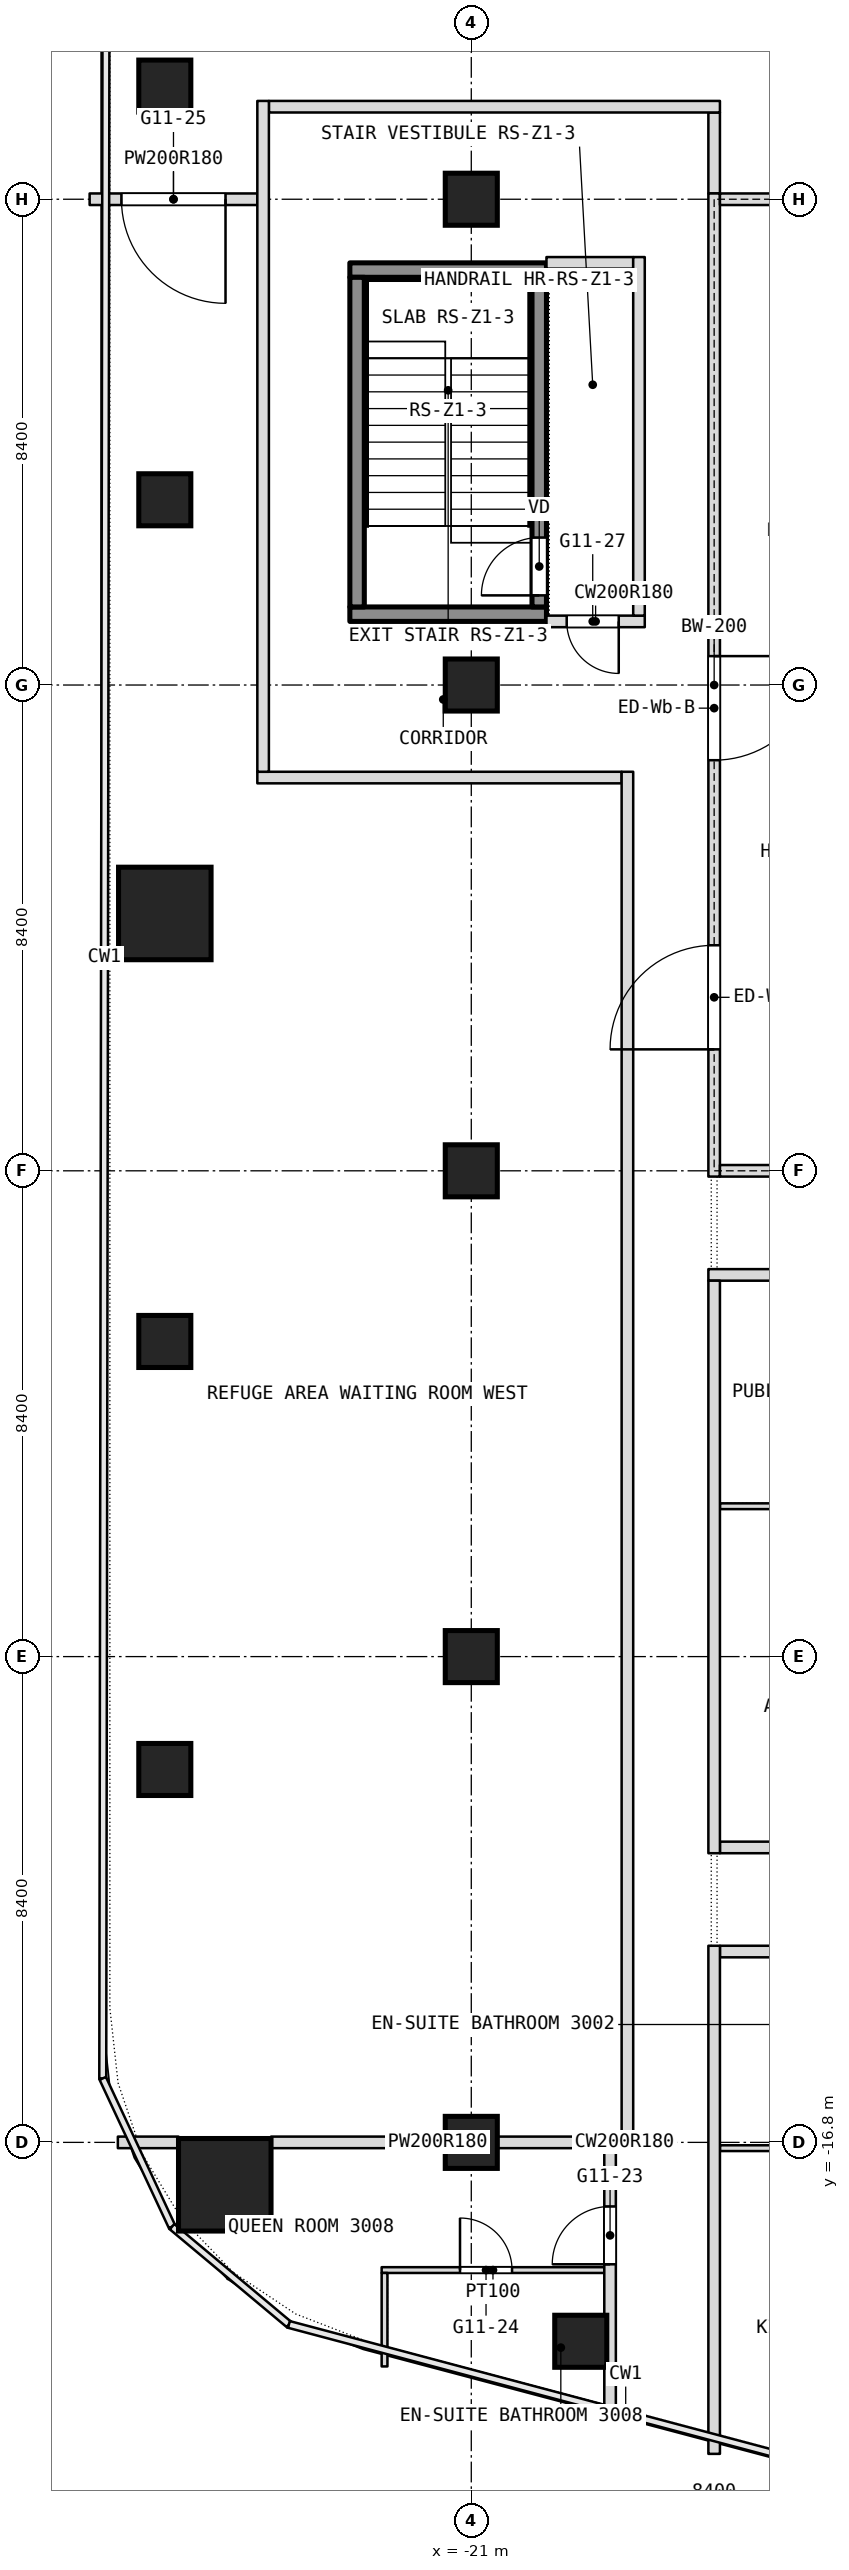
"""IFC4 building model, lengths in metres.
Left out: names, types, materials, properties, quantities, classifications, styles, units other than length and angle.
Written with IfcOpenShell. Run it as: python <this file> out.ifc"""

import sys

from ifc_helpers import new_model, si_unit, direction, frame, frame_2d, origin, origin_2d, place, context, subcontext, project, spatial, rectangle, extrude, element, fill, save


model = new_model("IFC4")
c1 = context("Model", 3, precision=1e-05, world=origin(), true_north=direction((0.0, 1.0)))
c2 = subcontext(c1, "Body", "Model", "MODEL_VIEW")
j1 = project(units=[si_unit("LENGTHUNIT", "METRE"), si_unit("PLANEANGLEUNIT", "RADIAN")], contexts=[c1])
p1 = place(None, origin())
s1 = spatial("IfcSite", under=j1, at=p1, CompositionType="ELEMENT")
p2 = place(p1, origin())
s2 = spatial("IfcBuilding", under=s1, at=p2, CompositionType="ELEMENT")
p3 = place(p2, frame((0.0, 0.0, 133.7)))
s3 = spatial("IfcBuildingStorey", under=s2, at=p3, CompositionType="ELEMENT", Elevation=133.7)
for number, where, z_axis, x_axis in (
    (1, (-25.263, -17.533, 0.0), (0.0, 0.0, 1.0), (1.0, 0.0, 0.0)),
    (2, (-26.3, 4.45, 0.0), (0.0, 0.0, 1.0), (1.0, 0.0, 0.0)),
):
    element("IfcColumn", number, at=place(p3, frame(where, z_axis=z_axis, x_axis=x_axis)), inside=s3, PredefinedType="COLUMN", context=c2, shape_type="SweptSolid", body=[
        extrude(rectangle(XDim=1.6, YDim=1.6, at=origin_2d()), origin(), (0.0, 0.0, 1.0), 3.6),
    ])
for number, where, z_axis, x_axis in (
    (3, (-21.0, -16.8, 0.0), (0.0, 0.0, 1.0), (1.0, 0.0, 0.0)),
    (4, (-21.0, -8.4, 0.0), (0.0, 0.0, 1.0), (1.0, 0.0, 0.0)),
    (5, (-21.0, 0.0, 0.0), (0.0, 0.0, 1.0), (1.0, 0.0, 0.0)),
    (6, (-21.0, 8.4, 0.0), (0.0, 0.0, 1.0), (1.0, 0.0, 0.0)),
    (7, (-21.0, 16.8, 0.0), (0.0, 0.0, 1.0), (1.0, 0.0, 0.0)),
    (8, (-26.3, -10.352, 0.0), (0.0, 0.0, 1.0), (1.0, 0.0, 0.0)),
    (9, (-26.3, -2.951, 0.0), (0.0, 0.0, 1.0), (1.0, 0.0, 0.0)),
    (10, (-26.3, 11.603, 0.0), (0.0, 0.0, 1.0), (1.0, 0.0, 0.0)),
    (11, (-26.3, 18.756, 0.0), (0.0, 0.0, 1.0), (1.0, 0.0, 0.0)),
    (12, (-19.107, -20.239, 0.0), (0.0, 0.0, 1.0), (1.0, 0.0, 0.0)),
):
    element("IfcColumn", number, at=place(p3, frame(where, z_axis=z_axis, x_axis=x_axis)), inside=s3, PredefinedType="COLUMN", context=c2, shape_type="SweptSolid", body=[
        extrude(rectangle(XDim=0.9, YDim=0.9, at=origin_2d()), origin(), (0.0, 0.0, 1.0), 3.6),
    ])
p4 = place(p3, frame((-22.55, -19.008, 0.0), z_axis=(0.0, 0.0, 1.0), x_axis=(1.0, 0.0, 0.0)))
e13 = element("IfcWall", 13, at=p4, inside=s3, PredefinedType="PARTITIONING", context=c2, shape_type="SweptSolid", body=[
    extrude(rectangle(XDim=3.85, YDim=0.1, at=frame_2d((1.925, 0.0))), origin(), (0.0, 0.0, 1.0), 3.34),
])
p5 = place(p4, frame((1.355, 0.0, 0.0)))
e14 = element("IfcOpeningElement", 14, at=p5, cuts=e13, PredefinedType="OPENING", context=c2, shape_type="SweptSolid", body=[
    extrude(rectangle(XDim=0.9, YDim=2.1, at=frame_2d((0.45, 1.05))), frame((0.0, 0.05, 0.0), z_axis=(0.0, -1.0, 0.0), x_axis=(1.0, 0.0, 0.0)), (0.0, 0.0, 1.0), 0.1),
])
p6 = place(p3, frame((-16.7, -16.9, 0.0), z_axis=(0.0, 0.0, 1.0), x_axis=(1.0, 0.0, 0.0)))
e15 = element("IfcWall", 15, at=p6, inside=s3, PredefinedType="PARTITIONING", context=c2, shape_type="SweptSolid", body=[
    extrude(rectangle(XDim=2.35, YDim=0.1, at=frame_2d((1.175, 0.0))), origin(), (0.0, 0.0, 1.0), 2.89),
])
p7 = place(p6, frame((1.3, 0.0, 0.0)))
e16 = element("IfcOpeningElement", 16, at=p7, cuts=e15, PredefinedType="OPENING", context=c2, shape_type="SweptSolid", body=[
    extrude(rectangle(XDim=0.9, YDim=2.1, at=frame_2d((0.45, 1.05))), frame((0.0, 0.05, 0.0), z_axis=(0.0, -1.0, 0.0), x_axis=(1.0, 0.0, 0.0)), (0.0, 0.0, 1.0), 0.1),
])
p8 = place(p3, frame((-27.112, -16.8, 0.0), z_axis=(0.0, 0.0, 1.0), x_axis=(1.0, 0.0, 0.0)))
e17 = element("IfcWall", 17, at=p8, inside=s3, PredefinedType="PARTITIONING", context=c2, shape_type="SweptSolid", body=[
    extrude(rectangle(XDim=1.049, YDim=0.2, at=frame_2d((0.524, 0.0))), origin(), (0.0, 0.0, 1.0), 3.34),
])
p9 = place(p3, frame((-24.463, -16.8, 0.0), z_axis=(0.0, 0.0, 1.0), x_axis=(1.0, 0.0, 0.0)))
e18 = element("IfcWall", 18, at=p9, inside=s3, PredefinedType="PARTITIONING", context=c2, shape_type="SweptSolid", body=[
    extrude(rectangle(XDim=5.763, YDim=0.2, at=frame_2d((2.881, 0.0))), origin(), (0.0, 0.0, 1.0), 2.89),
])
p10 = place(p3, frame((-18.5, -16.8, 0.0), z_axis=(0.0, 0.0, 1.0), x_axis=(1.0, 0.0, 0.0)))
e19 = element("IfcWall", 19, at=p10, inside=s3, PredefinedType="PARTITIONING", context=c2, shape_type="SweptSolid", body=[
    extrude(rectangle(XDim=0.3, YDim=0.2, at=frame_2d((0.15, 0.0))), origin(), (0.0, 0.0, 1.0), 3.34),
])
p11 = place(p3, frame((-16.7, -13.5, 0.0), z_axis=(0.0, 0.0, 1.0), x_axis=(1.0, 0.0, 0.0)))
e20 = element("IfcWall", 20, at=p11, inside=s3, PredefinedType="PARTITIONING", context=c2, shape_type="SweptSolid", body=[
    extrude(rectangle(XDim=4.1, YDim=0.2, at=frame_2d((2.05, 0.0))), origin(), (0.0, 0.0, 1.0), 3.34),
])
p12 = place(p11, frame((2.7, 0.0, 0.0)))
e21 = element("IfcOpeningElement", 21, at=p12, cuts=e20, PredefinedType="OPENING", context=c2, shape_type="SweptSolid", body=[
    extrude(rectangle(XDim=1.0, YDim=2.1, at=frame_2d((0.5, 1.05))), frame((0.0, 0.1, 0.0), z_axis=(0.0, -1.0, 0.0), x_axis=(1.0, 0.0, 0.0)), (0.0, 0.0, 1.0), 0.2),
])
p13 = place(p3, frame((-16.7, -11.7, 0.0), z_axis=(0.0, 0.0, 1.0), x_axis=(1.0, 0.0, 0.0)))
e22 = element("IfcWall", 22, at=p13, inside=s3, PredefinedType="PARTITIONING", context=c2, shape_type="SweptSolid", body=[
    extrude(rectangle(XDim=5.8, YDim=0.2, at=frame_2d((2.9, 0.0))), origin(), (0.0, 0.0, 1.0), 3.34),
])
p14 = place(p3, frame((-16.7, -5.8, 0.0), z_axis=(0.0, 0.0, 1.0), x_axis=(1.0, 0.0, 0.0)))
e23 = element("IfcWall", 23, at=p14, inside=s3, PredefinedType="PARTITIONING", context=c2, shape_type="SweptSolid", body=[
    extrude(rectangle(XDim=4.2, YDim=0.1, at=frame_2d((2.1, 0.0))), origin(), (0.0, 0.0, 1.0), 3.34),
])
p15 = place(p14, frame((1.55, 0.0, 0.0)))
e24 = element("IfcOpeningElement", 24, at=p15, cuts=e23, PredefinedType="OPENING", context=c2, shape_type="SweptSolid", body=[
    extrude(rectangle(XDim=0.9, YDim=2.1, at=frame_2d((0.45, 1.05))), frame((0.0, 0.05, 0.0), z_axis=(0.0, -1.0, 0.0), x_axis=(1.0, 0.0, 0.0)), (0.0, 0.0, 1.0), 0.1),
])
p16 = place(p3, frame((-16.9, -1.8, 0.0), z_axis=(0.0, 0.0, 1.0), x_axis=(1.0, 0.0, 0.0)))
e25 = element("IfcWall", 25, at=p16, inside=s3, PredefinedType="PARTITIONING", context=c2, shape_type="SweptSolid", body=[
    extrude(rectangle(XDim=8.2, YDim=0.2, at=frame_2d((4.1, 0.0))), origin(), (0.0, 0.0, 1.0), 3.34),
])
p17 = place(p16, frame((1.7, 0.0, 0.0)))
e26 = element("IfcOpeningElement", 26, at=p17, cuts=e25, PredefinedType="OPENING", context=c2, shape_type="SweptSolid", body=[
    extrude(rectangle(XDim=1.0, YDim=2.1, at=frame_2d((0.5, 1.05))), frame((0.0, 0.1, 0.0), z_axis=(0.0, -1.0, 0.0), x_axis=(1.0, 0.0, 0.0)), (0.0, 0.0, 1.0), 0.2),
])
p18 = place(p16, frame((5.8, 0.0, 0.0)))
e27 = element("IfcOpeningElement", 27, at=p18, cuts=e25, PredefinedType="OPENING", context=c2, shape_type="SweptSolid", body=[
    extrude(rectangle(XDim=1.0, YDim=2.1, at=frame_2d((0.5, 1.05))), frame((0.0, 0.1, 0.0), z_axis=(0.0, -1.0, 0.0), x_axis=(1.0, 0.0, 0.0)), (0.0, 0.0, 1.0), 0.2),
])
p19 = place(p3, frame((-24.7, 6.8, 0.0), z_axis=(0.0, 0.0, 1.0), x_axis=(1.0, 0.0, 0.0)))
e28 = element("IfcWall", 28, at=p19, inside=s3, PredefinedType="PARTITIONING", context=c2, shape_type="SweptSolid", body=[
    extrude(rectangle(XDim=6.3, YDim=0.2, at=frame_2d((3.15, 0.0))), origin(), (0.0, 0.0, 1.0), 3.34),
])
p20 = place(p3, frame((-19.7, 9.5, 0.0), z_axis=(0.0, 0.0, 1.0), x_axis=(1.0, 0.0, 0.0)))
e29 = element("IfcWall", 29, at=p20, inside=s3, PredefinedType="PARTITIONING", context=c2, shape_type="SweptSolid", body=[
    extrude(rectangle(XDim=1.7, YDim=0.2, at=frame_2d((0.85, 0.0))), origin(), (0.0, 0.0, 1.0), 3.34),
])
p21 = place(p20, frame((0.35, 0.0, 0.0)))
e30 = element("IfcOpeningElement", 30, at=p21, cuts=e29, PredefinedType="OPENING", context=c2, shape_type="SweptSolid", body=[
    extrude(rectangle(XDim=0.9, YDim=2.1, at=frame_2d((0.45, 1.05))), frame((0.0, 0.1, 0.0), z_axis=(0.0, -1.0, 0.0), x_axis=(1.0, 0.0, 0.0)), (0.0, 0.0, 1.0), 0.2),
])
p22 = place(p3, frame((-19.7, 15.7, 0.0), z_axis=(0.0, 0.0, 1.0), x_axis=(1.0, 0.0, 0.0)))
e31 = element("IfcWall", 31, at=p22, inside=s3, PredefinedType="PARTITIONING", context=c2, shape_type="SweptSolid", body=[
    extrude(rectangle(XDim=1.5, YDim=0.2, at=frame_2d((0.75, 0.0))), origin(), (0.0, 0.0, 1.0), 3.34),
])
p23 = place(p3, frame((-16.8, -22.186, 0.0), z_axis=(0.0, 0.0, 1.0), x_axis=(0.0, 1.0, 0.0)))
e32 = element("IfcWall", 32, at=p23, inside=s3, PredefinedType="PARTITIONING", context=c2, shape_type="SweptSolid", body=[
    extrude(rectangle(XDim=8.786, YDim=0.2, at=frame_2d((4.393, 0.0))), origin(), (0.0, 0.0, 1.0), 3.34),
])
p24 = place(p3, frame((-16.8, -11.8, 0.0), z_axis=(0.0, 0.0, 1.0), x_axis=(0.0, 1.0, 0.0)))
e33 = element("IfcWall", 33, at=p24, inside=s3, PredefinedType="PARTITIONING", context=c2, shape_type="SweptSolid", body=[
    extrude(rectangle(XDim=9.9, YDim=0.2, at=frame_2d((4.95, 0.0))), origin(), (0.0, 0.0, 1.0), 3.34),
])
p25 = place(p3, frame((-16.8, 16.9, 0.0), z_axis=(0.0, 0.0, 1.0), x_axis=(0.0, 1.0, 0.0)))
e34 = element("IfcWall", 34, at=p25, inside=s3, PredefinedType="PARTITIONING", context=c2, shape_type="SweptSolid", body=[
    extrude(rectangle(XDim=1.4, YDim=0.2, at=frame_2d((0.7, 0.0))), origin(), (0.0, 0.0, 1.0), 3.34),
])
p26 = place(p3, frame((-27.6, 16.8, 0.0), z_axis=(0.0, 0.0, 1.0), x_axis=(1.0, 0.0, 0.0)))
e35 = element("IfcWall", 35, at=p26, inside=s3, PredefinedType="PARTITIONING", context=c2, shape_type="SweptSolid", body=[
    extrude(rectangle(XDim=2.9, YDim=0.2, at=frame_2d((1.45, 0.0))), origin(), (0.0, 0.0, 1.0), 2.89),
])
p27 = place(p26, frame((0.55, 0.0, 0.0)))
e36 = element("IfcOpeningElement", 36, at=p27, cuts=e35, PredefinedType="OPENING", context=c2, shape_type="SweptSolid", body=[
    extrude(rectangle(XDim=1.8, YDim=2.1, at=frame_2d((0.9, 1.05))), frame((0.0, 0.1, 0.0), z_axis=(0.0, -1.0, 0.0), x_axis=(1.0, 0.0, 0.0)), (0.0, 0.0, 1.0), 0.2),
])
p28 = place(p3, frame((-18.1, 9.6, 0.0), z_axis=(0.0, 0.0, 1.0), x_axis=(0.0, 1.0, 0.0)))
e37 = element("IfcWall", 37, at=p28, inside=s3, PredefinedType="PARTITIONING", context=c2, shape_type="SweptSolid", body=[
    extrude(rectangle(XDim=6.2, YDim=0.2, at=frame_2d((3.1, 0.0))), origin(), (0.0, 0.0, 1.0), 3.34),
])
p29 = place(p3, frame((-18.3, -16.7, 0.0), z_axis=(0.0, 0.0, 1.0), x_axis=(0.0, 1.0, 0.0)))
e38 = element("IfcWall", 38, at=p29, inside=s3, PredefinedType="PARTITIONING", context=c2, shape_type="SweptSolid", body=[
    extrude(rectangle(XDim=23.6, YDim=0.2, at=frame_2d((11.8, 0.0))), origin(), (0.0, 0.0, 1.0), 3.34),
])
p30 = place(p3, frame((-24.5, 18.4, 0.0), z_axis=(0.0, 0.0, 1.0), x_axis=(1.0, 0.0, 0.0)))
e39 = element("IfcWall", 39, at=p30, inside=s3, PredefinedType="PARTITIONING", context=c2, shape_type="SweptSolid", body=[
    extrude(rectangle(XDim=7.8, YDim=0.2, at=frame_2d((3.9, 0.0))), origin(), (0.0, 0.0, 1.0), 3.34),
])
p31 = place(p3, frame((-18.6, -21.708, 0.0), z_axis=(0.0, 0.0, 1.0), x_axis=(0.0, 1.0, 0.0)))
e40 = element("IfcWall", 40, at=p31, inside=s3, PredefinedType="PARTITIONING", context=c2, shape_type="SweptSolid", body=[
    extrude(rectangle(XDim=5.008, YDim=0.2, at=frame_2d((2.504, 0.0))), origin(), (0.0, 0.0, 1.0), 3.34),
])
p32 = place(p31, frame((2.8, 0.0, 0.0)))
e41 = element("IfcOpeningElement", 41, at=p32, cuts=e40, PredefinedType="OPENING", context=c2, shape_type="SweptSolid", body=[
    extrude(rectangle(XDim=1.0, YDim=2.1, at=frame_2d((0.5, 1.05))), frame((0.0, 0.1, 0.0), z_axis=(0.0, -1.0, 0.0), x_axis=(1.0, 0.0, 0.0)), (0.0, 0.0, 1.0), 0.2),
])
p33 = place(p3, frame((-22.5, -20.674, 0.0), z_axis=(0.0, 0.0, 1.0), x_axis=(0.0, 1.0, 0.0)))
e42 = element("IfcWall", 42, at=p33, inside=s3, PredefinedType="PARTITIONING", context=c2, shape_type="SweptSolid", body=[
    extrude(rectangle(XDim=1.616, YDim=0.1, at=frame_2d((0.808, 0.0))), origin(), (0.0, 0.0, 1.0), 3.34),
])
p34 = place(p3, frame((-24.6, 6.9, 0.0), z_axis=(0.0, 0.0, 1.0), x_axis=(0.0, 1.0, 0.0)))
e43 = element("IfcWall", 43, at=p34, inside=s3, PredefinedType="PARTITIONING", context=c2, shape_type="SweptSolid", body=[
    extrude(rectangle(XDim=11.6, YDim=0.2, at=frame_2d((5.8, 0.0))), origin(), (0.0, 0.0, 1.0), 3.34),
])
p35 = place(p3, frame((-16.8, -0.1, 0.0), z_axis=(0.0, 0.0, 1.0), x_axis=(0.0, 1.0, 0.0)))
e44 = element("IfcWall", 44, at=p35, inside=s3, PredefinedType="PARTITIONING", context=c2, shape_type="SweptSolid", body=[
    extrude(rectangle(XDim=17.0, YDim=0.2, at=frame_2d((8.5, 0.0))), origin(), (0.0, 0.0, 1.0), 3.34),
])
p36 = place(p35, frame((2.2, 0.0, 0.0)))
e45 = element("IfcOpeningElement", 45, at=p36, cuts=e44, PredefinedType="OPENING", context=c2, shape_type="SweptSolid", body=[
    extrude(rectangle(XDim=1.8, YDim=2.1, at=frame_2d((0.9, 1.05))), frame((0.0, 0.1, 0.0), z_axis=(0.0, -1.0, 0.0), x_axis=(1.0, 0.0, 0.0)), (0.0, 0.0, 1.0), 0.2),
])
p37 = place(p35, frame((7.2, 0.0, 0.0)))
e46 = element("IfcOpeningElement", 46, at=p37, cuts=e44, PredefinedType="OPENING", context=c2, shape_type="SweptSolid", body=[
    extrude(rectangle(XDim=1.8, YDim=2.1, at=frame_2d((0.9, 1.05))), frame((0.0, 0.1, 0.0), z_axis=(0.0, -1.0, 0.0), x_axis=(1.0, 0.0, 0.0)), (0.0, 0.0, 1.0), 0.2),
])
p38 = place(p3, frame((-16.7, 0.0, 0.0), z_axis=(0.0, 0.0, 1.0), x_axis=(1.0, 0.0, 0.0)))
e47 = element("IfcWall", 47, at=p38, inside=s3, PredefinedType="PARTITIONING", context=c2, shape_type="SweptSolid", body=[
    extrude(rectangle(XDim=4.6, YDim=0.2, at=frame_2d((2.3, 0.0))), origin(), (0.0, 0.0, 1.0), 2.89),
])
p39 = place(p38, frame((3.1, 0.0, 0.0)))
e48 = element("IfcOpeningElement", 48, at=p39, cuts=e47, PredefinedType="OPENING", context=c2, shape_type="SweptSolid", body=[
    extrude(rectangle(XDim=1.2, YDim=2.1, at=frame_2d((0.6, 1.05))), frame((0.0, 0.1, 0.0), z_axis=(0.0, -1.0, 0.0), x_axis=(1.0, 0.0, 0.0)), (0.0, 0.0, 1.0), 0.2),
])
p40 = place(p3, frame((-16.7, 16.8, 0.0), z_axis=(0.0, 0.0, 1.0), x_axis=(1.0, 0.0, 0.0)))
e49 = element("IfcWall", 49, at=p40, inside=s3, PredefinedType="PARTITIONING", context=c2, shape_type="SweptSolid", body=[
    extrude(rectangle(XDim=4.6, YDim=0.2, at=frame_2d((2.3, 0.0))), origin(), (0.0, 0.0, 1.0), 2.89),
])
p41 = place(p40, frame((3.1, 0.0, 0.0)))
e50 = element("IfcOpeningElement", 50, at=p41, cuts=e49, PredefinedType="OPENING", context=c2, shape_type="SweptSolid", body=[
    extrude(rectangle(XDim=1.2, YDim=2.1, at=frame_2d((0.6, 1.05))), frame((0.0, 0.1, 0.0), z_axis=(0.0, -1.0, 0.0), x_axis=(1.0, 0.0, 0.0)), (0.0, 0.0, 1.0), 0.2),
])
for number, where, z_axis, x_axis in (
    (51, (-23.1, 9.625, 0.1), (0.0, 0.0, 1.0), (1.0, 0.0, 0.0)),
    (52, (-23.1, 15.575, 0.1), (0.0, 0.0, 1.0), (1.0, 0.0, 0.0)),
):
    element("IfcWall", number, at=place(p3, frame(where, z_axis=z_axis, x_axis=x_axis)), inside=s3, PredefinedType="SHEAR", context=c2, shape_type="SweptSolid", body=[
        extrude(rectangle(XDim=3.4, YDim=0.25, at=frame_2d((1.7, 0.0))), origin(), (0.0, 0.0, 1.0), 3.6),
    ])
p42 = place(p3, frame((-22.975, 9.75, 0.1), z_axis=(0.0, 0.0, 1.0), x_axis=(0.0, 1.0, 0.0)))
e53 = element("IfcWall", 53, at=p42, inside=s3, PredefinedType="SHEAR", context=c2, shape_type="SweptSolid", body=[
    extrude(rectangle(XDim=5.7, YDim=0.25, at=frame_2d((2.85, 0.0))), origin(), (0.0, 0.0, 1.0), 3.6),
])
p43 = place(p3, frame((-19.825, 9.75, 0.1), z_axis=(0.0, 0.0, 1.0), x_axis=(0.0, 1.0, 0.0)))
e54 = element("IfcWall", 54, at=p43, inside=s3, PredefinedType="SHEAR", context=c2, shape_type="SweptSolid", body=[
    extrude(rectangle(XDim=5.7, YDim=0.25, at=frame_2d((2.85, 0.0))), origin(), (0.0, 0.0, 1.0), 3.6),
])
p44 = place(p43, frame((0.2, 0.0, 0.0)))
e55 = element("IfcOpeningElement", 55, at=p44, cuts=e54, PredefinedType="OPENING", context=c2, shape_type="SweptSolid", body=[
    extrude(rectangle(XDim=1.0, YDim=2.1, at=frame_2d((0.5, 1.05))), frame((0.0, 0.125, 0.0), z_axis=(0.0, -1.0, 0.0), x_axis=(1.0, 0.0, 0.0)), (0.0, 0.0, 1.0), 0.25),
])
p45 = place(p5, origin())
e56 = element("IfcDoor", 56, at=p45, inside=s3, OperationType="SINGLE_SWING_LEFT", PredefinedType="DOOR", context=c2, shape_type="SweptSolid", body=[
    extrude(rectangle(XDim=0.9, YDim=2.1, at=frame_2d((0.45, 1.05))), frame((0.0, 0.025, 0.0), z_axis=(0.0, -1.0, 0.0), x_axis=(1.0, 0.0, 0.0)), (0.0, 0.0, 1.0), 0.05),
])
fill(e14, e56)
p46 = place(p21, origin())
e57 = element("IfcDoor", 57, at=p46, inside=s3, OperationType="SINGLE_SWING_RIGHT", PredefinedType="DOOR", context=c2, shape_type="SweptSolid", body=[
    extrude(rectangle(XDim=0.9, YDim=2.1, at=frame_2d((0.45, 1.05))), frame((0.0, 0.025, 0.0), z_axis=(0.0, -1.0, 0.0), x_axis=(1.0, 0.0, 0.0)), (0.0, 0.0, 1.0), 0.05),
])
fill(e30, e57)
p47 = place(p27, origin())
e58 = element("IfcDoor", 58, at=p47, inside=s3, OperationType="DOUBLE_DOOR_SINGLE_SWING", PredefinedType="DOOR", context=c2, shape_type="SweptSolid", body=[
    extrude(rectangle(XDim=1.8, YDim=2.1, at=frame_2d((0.9, 1.05))), frame((0.0, 0.025, 0.0), z_axis=(0.0, -1.0, 0.0), x_axis=(1.0, 0.0, 0.0)), (0.0, 0.0, 1.0), 0.05),
])
fill(e36, e58)
p48 = place(p32, origin())
e59 = element("IfcDoor", 59, at=p48, inside=s3, OperationType="SINGLE_SWING_LEFT", PredefinedType="DOOR", context=c2, shape_type="SweptSolid", body=[
    extrude(rectangle(XDim=1.0, YDim=2.1, at=frame_2d((0.5, 1.05))), frame((0.0, 0.025, 0.0), z_axis=(0.0, -1.0, 0.0), x_axis=(1.0, 0.0, 0.0)), (0.0, 0.0, 1.0), 0.05),
])
fill(e41, e59)
p49 = place(p44, origin())
e60 = element("IfcDoor", 60, at=p49, inside=s3, OperationType="SINGLE_SWING_LEFT", PredefinedType="DOOR", context=c2, shape_type="SweptSolid", body=[
    extrude(rectangle(XDim=1.0, YDim=2.1, at=frame_2d((0.5, 1.05))), frame((0.0, 0.025, 0.0), z_axis=(0.0, -1.0, 0.0), x_axis=(1.0, 0.0, 0.0)), (0.0, 0.0, 1.0), 0.05),
])
fill(e55, e60)
p50 = place(p36, origin())
e61 = element("IfcDoor", 61, at=p50, inside=s3, OperationType="DOUBLE_DOOR_SINGLE_SWING", PredefinedType="DOOR", context=c2, shape_type="SweptSolid", body=[
    extrude(rectangle(XDim=1.8, YDim=2.1, at=frame_2d((0.9, 1.05))), frame((0.0, 0.025, 0.0), z_axis=(0.0, -1.0, 0.0), x_axis=(1.0, 0.0, 0.0)), (0.0, 0.0, 1.0), 0.05),
])
fill(e45, e61)
p51 = place(p37, origin())
e62 = element("IfcDoor", 62, at=p51, inside=s3, OperationType="DOUBLE_DOOR_SINGLE_SWING", PredefinedType="DOOR", context=c2, shape_type="SweptSolid", body=[
    extrude(rectangle(XDim=1.8, YDim=2.1, at=frame_2d((0.9, 1.05))), frame((0.0, 0.025, 0.0), z_axis=(0.0, -1.0, 0.0), x_axis=(1.0, 0.0, 0.0)), (0.0, 0.0, 1.0), 0.05),
])
fill(e46, e62)
save(model, sys.argv[1])
